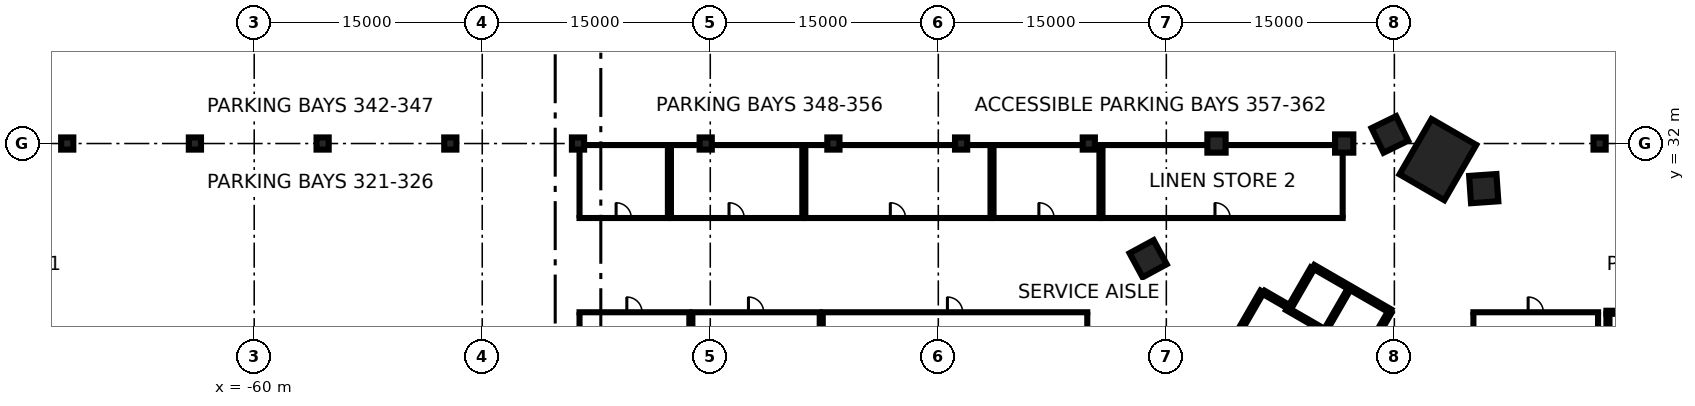
"""IFC4 building model, lengths in metres.
Left out: names, types, materials, properties, quantities, classifications, styles, units other than length and angle.
Written with IfcOpenShell. Run it as: python <this file> out.ifc"""

import sys

from ifc_helpers import new_model, si_unit, direction, frame, frame_2d, origin, origin_2d, place, context, subcontext, project, spatial, rectangle, extrude, element, fill, save


model = new_model("IFC4")
c1 = context("Model", 3, precision=1e-05, world=origin(), true_north=direction((0.0, 1.0)))
c2 = subcontext(c1, "Body", "Model", "MODEL_VIEW")
j1 = project(units=[si_unit("LENGTHUNIT", "METRE"), si_unit("PLANEANGLEUNIT", "RADIAN")], contexts=[c1])
p1 = place(None, origin())
s1 = spatial("IfcSite", under=j1, at=p1, CompositionType="ELEMENT")
p2 = place(p1, origin())
s2 = spatial("IfcBuilding", under=s1, at=p2, CompositionType="ELEMENT")
p3 = place(p2, frame((0.0, 0.0, -3.6)))
s3 = spatial("IfcBuildingStorey", under=s2, at=p3, CompositionType="ELEMENT", Elevation=-3.6)
p4 = place(p3, frame((17.865, 30.942, -0.4), z_axis=(0.0, 0.0, 1.0), x_axis=(0.5, 0.866025403784, 0.0)))
e1 = element("IfcColumn", 1, at=p4, inside=s3, PredefinedType="COLUMN", context=c2, shape_type="SweptSolid", body=[
    extrude(rectangle(XDim=4.2, YDim=3.4, at=origin_2d()), origin(), (0.0, 0.0, 1.0), 3.55),
])
for number, where, z_axis, x_axis in (
    (2, (20.879, 29.034, -0.4), (0.0, 0.0, 1.0), (0.998, 0.07, 0.0)),
    (3, (14.705, 32.599, -0.4), (0.0, 0.0, 1.0), (-0.438, 0.899, 0.0)),
    (4, (-1.197, 24.423, -0.4), (0.0, 0.0, 1.0), (-0.476, 0.879, 0.0)),
):
    element("IfcColumn", number, at=place(p3, frame(where, z_axis=z_axis, x_axis=x_axis)), inside=s3, PredefinedType="COLUMN", context=c2, shape_type="SweptSolid", body=[
        extrude(rectangle(XDim=1.8, YDim=1.8, at=origin_2d()), origin(), (0.0, 0.0, 1.0), 3.55),
    ])
for number, where, z_axis, x_axis in (
    (5, (-72.3, 32.0, -0.4), (0.0, 0.0, 1.0), (1.0, 0.0, 0.0)),
    (6, (-63.9, 32.0, -0.4), (0.0, 0.0, 1.0), (1.0, 0.0, 0.0)),
    (7, (-55.5, 32.0, -0.4), (0.0, 0.0, 1.0), (1.0, 0.0, 0.0)),
    (8, (-47.1, 32.0, -0.4), (0.0, 0.0, 1.0), (1.0, 0.0, 0.0)),
    (9, (-38.7, 32.0, -0.4), (0.0, 0.0, 1.0), (1.0, 0.0, 0.0)),
    (10, (-30.3, 32.0, -0.4), (0.0, 0.0, 1.0), (1.0, 0.0, 0.0)),
    (11, (-21.9, 32.0, -0.4), (0.0, 0.0, 1.0), (1.0, 0.0, 0.0)),
    (12, (-13.5, 32.0, -0.4), (0.0, 0.0, 1.0), (1.0, 0.0, 0.0)),
    (13, (-5.1, 32.0, -0.4), (0.0, 0.0, 1.0), (1.0, 0.0, 0.0)),
):
    element("IfcColumn", number, at=place(p3, frame(where, z_axis=z_axis, x_axis=x_axis)), inside=s3, PredefinedType="COLUMN", context=c2, shape_type="SweptSolid", body=[
        extrude(rectangle(XDim=0.8, YDim=0.8, at=origin_2d()), origin(), (0.0, 0.0, 1.0), 3.55),
    ])
for number, where, z_axis, x_axis in (
    (14, (3.3, 32.0, -0.4), (0.0, 0.0, 1.0), (1.0, 0.0, 0.0)),
    (15, (11.7, 32.0, -0.4), (0.0, 0.0, 1.0), (1.0, 0.0, 0.0)),
):
    element("IfcColumn", number, at=place(p3, frame(where, z_axis=z_axis, x_axis=x_axis)), inside=s3, PredefinedType="COLUMN", context=c2, shape_type="SweptSolid", body=[
        extrude(rectangle(XDim=1.2, YDim=1.2, at=origin_2d()), origin(), (0.0, 0.0, 1.0), 3.55),
    ])
p5 = place(p3, frame((28.5, 32.0, -0.4), z_axis=(0.0, 0.0, 1.0), x_axis=(1.0, 0.0, 0.0)))
e16 = element("IfcColumn", 16, at=p5, inside=s3, PredefinedType="COLUMN", context=c2, shape_type="SweptSolid", body=[
    extrude(rectangle(XDim=0.8, YDim=0.8, at=origin_2d()), origin(), (0.0, 0.0, 1.0), 3.55),
])
p6 = place(p3, frame((3.179, 16.856, 0.0), z_axis=(0.0, 0.0, 1.0), x_axis=(0.500004234368, 0.866022959057, 0.0)))
e17 = element("IfcWall", 17, at=p6, inside=s3, PredefinedType="SHEAR", context=c2, shape_type="SweptSolid", body=[
    extrude(rectangle(XDim=6.25, YDim=0.25, at=frame_2d((3.125, 0.0))), origin(), (0.0, 0.0, 1.0), 3.15),
])
p7 = place(p3, frame((9.673, 23.903, 0.0), z_axis=(0.0, 0.0, 1.0), x_axis=(0.86603616409, -0.499981362141, 0.0)))
e18 = element("IfcWall", 18, at=p7, inside=s3, PredefinedType="SHEAR", context=c2, shape_type="SweptSolid", body=[
    extrude(rectangle(XDim=5.85, YDim=0.25, at=frame_2d((2.925, 0.0))), origin(), (0.0, 0.0, 1.0), 3.15),
])
for number, where, z_axis, x_axis in (
    (19, (8.123, 21.219, 0.0), (0.0, 0.0, 1.0), (0.5, 0.866, 0.0)),
    (20, (14.676, 20.87, 0.0), (0.0, 0.0, 1.0), (-0.5, -0.866, 0.0)),
):
    element("IfcWall", number, at=place(p3, frame(where, z_axis=z_axis, x_axis=x_axis)), inside=s3, PredefinedType="SHEAR", context=c2, shape_type="SweptSolid", body=[
        extrude(rectangle(XDim=2.975, YDim=0.25, at=frame_2d((1.487, 0.0))), origin(), (0.0, 0.0, 1.0), 3.15),
    ])
p8 = place(p3, frame((6.413, 22.206, 0.0), z_axis=(0.0, 0.0, 1.0), x_axis=(0.866016279763, -0.500015802937, 0.0)))
e21 = element("IfcWall", 21, at=p8, inside=s3, PredefinedType="SHEAR", context=c2, shape_type="SweptSolid", body=[
    extrude(rectangle(XDim=1.849, YDim=0.25, at=frame_2d((0.925, 0.0))), origin(), (0.0, 0.0, 1.0), 3.15),
])
p9 = place(p3, frame((13.21, 18.08, 0.0), z_axis=(0.0, 0.0, 1.0), x_axis=(-0.866030299012, 0.499991521122, 0.0)))
e22 = element("IfcWall", 22, at=p9, inside=s3, PredefinedType="SHEAR", context=c2, shape_type="SweptSolid", body=[
    extrude(rectangle(XDim=6.1, YDim=0.2, at=frame_2d((3.05, 0.0))), origin(), (0.0, 0.0, 1.0), 3.15),
])
p10 = place(p3, frame((10.489, 19.767, 0.0), z_axis=(0.0, 0.0, 1.0), x_axis=(0.499946628782, 0.866056215479, 0.0)))
e23 = element("IfcWall", 23, at=p10, inside=s3, PredefinedType="SHEAR", context=c2, shape_type="SweptSolid", body=[
    extrude(rectangle(XDim=3.048, YDim=0.2, at=frame_2d((1.524, 0.0))), origin(), (0.0, 0.0, 1.0), 3.15),
])
p11 = place(p3, frame((-38.7, 20.9, 0.0), z_axis=(0.0, 0.0, 1.0), x_axis=(1.0, 0.0, 0.0)))
e24 = element("IfcWall", 24, at=p11, inside=s3, PredefinedType="PARTITIONING", context=c2, shape_type="SweptSolid", body=[
    extrude(rectangle(XDim=7.423, YDim=0.2, at=frame_2d((3.712, 0.0))), origin(), (0.0, 0.0, 1.0), 3.15),
])
p12 = place(p11, frame((3.212, 0.0, 0.0)))
e25 = element("IfcOpeningElement", 25, at=p12, cuts=e24, PredefinedType="OPENING", context=c2, shape_type="SweptSolid", body=[
    extrude(rectangle(XDim=1.0, YDim=2.1, at=frame_2d((0.5, 1.05))), frame((0.0, 0.11, 0.0), z_axis=(0.0, -1.0, 0.0), x_axis=(1.0, 0.0, 0.0)), (0.0, 0.0, 1.0), 0.22),
])
p13 = place(p3, frame((-38.6, 16.6, 0.0), z_axis=(0.0, 0.0, 1.0), x_axis=(0.0, 1.0, 0.0)))
e26 = element("IfcWall", 26, at=p13, inside=s3, PredefinedType="PARTITIONING", context=c2, shape_type="SweptSolid", body=[
    extrude(rectangle(XDim=4.2, YDim=0.2, at=frame_2d((2.1, 0.0))), origin(), (0.0, 0.0, 1.0), 3.15),
])
p14 = place(p3, frame((-31.377, 16.2, 0.0), z_axis=(0.0, 0.0, 1.0), x_axis=(0.0, 1.0, 0.0)))
e27 = element("IfcWall", 27, at=p14, inside=s3, PredefinedType="PARTITIONING", context=c2, shape_type="SweptSolid", body=[
    extrude(rectangle(XDim=4.6, YDim=0.2, at=frame_2d((2.3, 0.0))), origin(), (0.0, 0.0, 1.0), 3.15),
])
p15 = place(p3, frame((-31.277, 20.9, 0.0), z_axis=(0.0, 0.0, 1.0), x_axis=(1.0, 0.0, 0.0)))
e28 = element("IfcWall", 28, at=p15, inside=s3, PredefinedType="PARTITIONING", context=c2, shape_type="SweptSolid", body=[
    extrude(rectangle(XDim=8.577, YDim=0.2, at=frame_2d((4.288, 0.0))), origin(), (0.0, 0.0, 1.0), 3.15),
])
p16 = place(p15, frame((3.788, 0.0, 0.0)))
e29 = element("IfcOpeningElement", 29, at=p16, cuts=e28, PredefinedType="OPENING", context=c2, shape_type="SweptSolid", body=[
    extrude(rectangle(XDim=1.0, YDim=2.1, at=frame_2d((0.5, 1.05))), frame((0.0, 0.11, 0.0), z_axis=(0.0, -1.0, 0.0), x_axis=(1.0, 0.0, 0.0)), (0.0, 0.0, 1.0), 0.22),
])
for number, where, z_axis, x_axis in (
    (30, (-31.177, 16.2, 0.0), (0.0, 0.0, 1.0), (0.0, 1.0, 0.0)),
    (31, (-22.8, 16.2, 0.0), (0.0, 0.0, 1.0), (0.0, 1.0, 0.0)),
):
    element("IfcWall", number, at=place(p3, frame(where, z_axis=z_axis, x_axis=x_axis)), inside=s3, PredefinedType="PARTITIONING", context=c2, shape_type="SweptSolid", body=[
        extrude(rectangle(XDim=4.6, YDim=0.2, at=frame_2d((2.3, 0.0))), origin(), (0.0, 0.0, 1.0), 3.15),
    ])
p17 = place(p3, frame((-22.7, 20.9, 0.0), z_axis=(0.0, 0.0, 1.0), x_axis=(1.0, 0.0, 0.0)))
e32 = element("IfcWall", 32, at=p17, inside=s3, PredefinedType="PARTITIONING", context=c2, shape_type="SweptSolid", body=[
    extrude(rectangle(XDim=17.6, YDim=0.2, at=frame_2d((8.8, 0.0))), origin(), (0.0, 0.0, 1.0), 3.15),
])
p18 = place(p17, frame((8.3, 0.0, 0.0)))
e33 = element("IfcOpeningElement", 33, at=p18, cuts=e32, PredefinedType="OPENING", context=c2, shape_type="SweptSolid", body=[
    extrude(rectangle(XDim=1.0, YDim=2.1, at=frame_2d((0.5, 1.05))), frame((0.0, 0.11, 0.0), z_axis=(0.0, -1.0, 0.0), x_axis=(1.0, 0.0, 0.0)), (0.0, 0.0, 1.0), 0.22),
])
p19 = place(p3, frame((-22.6, 16.2, 0.0), z_axis=(0.0, 0.0, 1.0), x_axis=(0.0, 1.0, 0.0)))
e34 = element("IfcWall", 34, at=p19, inside=s3, PredefinedType="PARTITIONING", context=c2, shape_type="SweptSolid", body=[
    extrude(rectangle(XDim=4.6, YDim=0.2, at=frame_2d((2.3, 0.0))), origin(), (0.0, 0.0, 1.0), 3.15),
])
p20 = place(p3, frame((-5.2, 16.6, 0.0), z_axis=(0.0, 0.0, 1.0), x_axis=(0.0, 1.0, 0.0)))
e35 = element("IfcWall", 35, at=p20, inside=s3, PredefinedType="PARTITIONING", context=c2, shape_type="SweptSolid", body=[
    extrude(rectangle(XDim=4.2, YDim=0.2, at=frame_2d((2.1, 0.0))), origin(), (0.0, 0.0, 1.0), 3.15),
])
p21 = place(p3, frame((20.1, 20.9, 0.0), z_axis=(0.0, 0.0, 1.0), x_axis=(1.0, 0.0, 0.0)))
e36 = element("IfcWall", 36, at=p21, inside=s3, PredefinedType="PARTITIONING", context=c2, shape_type="SweptSolid", body=[
    extrude(rectangle(XDim=8.4, YDim=0.2, at=frame_2d((4.2, 0.0))), origin(), (0.0, 0.0, 1.0), 3.15),
])
p22 = place(p21, frame((3.7, 0.0, 0.0)))
e37 = element("IfcOpeningElement", 37, at=p22, cuts=e36, PredefinedType="OPENING", context=c2, shape_type="SweptSolid", body=[
    extrude(rectangle(XDim=1.0, YDim=2.1, at=frame_2d((0.5, 1.05))), frame((0.0, 0.11, 0.0), z_axis=(0.0, -1.0, 0.0), x_axis=(1.0, 0.0, 0.0)), (0.0, 0.0, 1.0), 0.22),
])
p23 = place(p3, frame((20.2, 16.6, 0.0), z_axis=(0.0, 0.0, 1.0), x_axis=(0.0, 1.0, 0.0)))
e38 = element("IfcWall", 38, at=p23, inside=s3, PredefinedType="PARTITIONING", context=c2, shape_type="SweptSolid", body=[
    extrude(rectangle(XDim=4.2, YDim=0.2, at=frame_2d((2.1, 0.0))), origin(), (0.0, 0.0, 1.0), 3.15),
])
p24 = place(p3, frame((28.4, 16.4, 0.0), z_axis=(0.0, 0.0, 1.0), x_axis=(0.0, 1.0, 0.0)))
e39 = element("IfcWall", 39, at=p24, inside=s3, PredefinedType="PARTITIONING", context=c2, shape_type="SweptSolid", body=[
    extrude(rectangle(XDim=4.4, YDim=0.2, at=frame_2d((2.2, 0.0))), origin(), (0.0, 0.0, 1.0), 3.15),
])
p25 = place(p3, frame((-38.7, 27.1, 0.0), z_axis=(0.0, 0.0, 1.0), x_axis=(1.0, 0.0, 0.0)))
e40 = element("IfcWall", 40, at=p25, inside=s3, PredefinedType="PARTITIONING", context=c2, shape_type="SweptSolid", body=[
    extrude(rectangle(XDim=6.012, YDim=0.2, at=frame_2d((3.006, 0.0))), origin(), (0.0, 0.0, 1.0), 3.15),
])
p26 = place(p25, frame((2.506, 0.0, 0.0)))
e41 = element("IfcOpeningElement", 41, at=p26, cuts=e40, PredefinedType="OPENING", context=c2, shape_type="SweptSolid", body=[
    extrude(rectangle(XDim=1.0, YDim=2.1, at=frame_2d((0.5, 1.05))), frame((0.0, 0.11, 0.0), z_axis=(0.0, -1.0, 0.0), x_axis=(1.0, 0.0, 0.0)), (0.0, 0.0, 1.0), 0.22),
])
p27 = place(p3, frame((-38.7, 31.9, 0.0), z_axis=(0.0, 0.0, 1.0), x_axis=(1.0, 0.0, 0.0)))
e42 = element("IfcWall", 42, at=p27, inside=s3, PredefinedType="PARTITIONING", context=c2, shape_type="SweptSolid", body=[
    extrude(rectangle(XDim=6.012, YDim=0.2, at=frame_2d((3.006, 0.0))), origin(), (0.0, 0.0, 1.0), 3.15),
])
p28 = place(p3, frame((-38.6, 27.2, 0.0), z_axis=(0.0, 0.0, 1.0), x_axis=(0.0, 1.0, 0.0)))
e43 = element("IfcWall", 43, at=p28, inside=s3, PredefinedType="PARTITIONING", context=c2, shape_type="SweptSolid", body=[
    extrude(rectangle(XDim=4.4, YDim=0.2, at=frame_2d((2.2, 0.0))), origin(), (0.0, 0.0, 1.0), 3.15),
])
p29 = place(p3, frame((-32.787, 27.2, 0.0), z_axis=(0.0, 0.0, 1.0), x_axis=(0.0, 1.0, 0.0)))
e44 = element("IfcWall", 44, at=p29, inside=s3, PredefinedType="PARTITIONING", context=c2, shape_type="SweptSolid", body=[
    extrude(rectangle(XDim=4.6, YDim=0.2, at=frame_2d((2.3, 0.0))), origin(), (0.0, 0.0, 1.0), 3.15),
])
p30 = place(p3, frame((-32.688, 27.1, 0.0), z_axis=(0.0, 0.0, 1.0), x_axis=(1.0, 0.0, 0.0)))
e45 = element("IfcWall", 45, at=p30, inside=s3, PredefinedType="PARTITIONING", context=c2, shape_type="SweptSolid", body=[
    extrude(rectangle(XDim=8.842, YDim=0.2, at=frame_2d((4.421, 0.0))), origin(), (0.0, 0.0, 1.0), 3.15),
])
p31 = place(p30, frame((3.921, 0.0, 0.0)))
e46 = element("IfcOpeningElement", 46, at=p31, cuts=e45, PredefinedType="OPENING", context=c2, shape_type="SweptSolid", body=[
    extrude(rectangle(XDim=1.0, YDim=2.1, at=frame_2d((0.5, 1.05))), frame((0.0, 0.11, 0.0), z_axis=(0.0, -1.0, 0.0), x_axis=(1.0, 0.0, 0.0)), (0.0, 0.0, 1.0), 0.22),
])
p32 = place(p3, frame((-32.688, 31.9, 0.0), z_axis=(0.0, 0.0, 1.0), x_axis=(1.0, 0.0, 0.0)))
e47 = element("IfcWall", 47, at=p32, inside=s3, PredefinedType="PARTITIONING", context=c2, shape_type="SweptSolid", body=[
    extrude(rectangle(XDim=8.842, YDim=0.2, at=frame_2d((4.421, 0.0))), origin(), (0.0, 0.0, 1.0), 3.15),
])
for number, where, z_axis, x_axis in (
    (48, (-32.587, 27.2, 0.0), (0.0, 0.0, 1.0), (0.0, 1.0, 0.0)),
    (49, (-23.945, 27.2, 0.0), (0.0, 0.0, 1.0), (0.0, 1.0, 0.0)),
):
    element("IfcWall", number, at=place(p3, frame(where, z_axis=z_axis, x_axis=x_axis)), inside=s3, PredefinedType="PARTITIONING", context=c2, shape_type="SweptSolid", body=[
        extrude(rectangle(XDim=4.6, YDim=0.2, at=frame_2d((2.3, 0.0))), origin(), (0.0, 0.0, 1.0), 3.15),
    ])
p33 = place(p3, frame((-23.845, 27.1, 0.0), z_axis=(0.0, 0.0, 1.0), x_axis=(1.0, 0.0, 0.0)))
e50 = element("IfcWall", 50, at=p33, inside=s3, PredefinedType="PARTITIONING", context=c2, shape_type="SweptSolid", body=[
    extrude(rectangle(XDim=12.379, YDim=0.2, at=frame_2d((6.189, 0.0))), origin(), (0.0, 0.0, 1.0), 3.15),
])
p34 = place(p33, frame((5.689, 0.0, 0.0)))
e51 = element("IfcOpeningElement", 51, at=p34, cuts=e50, PredefinedType="OPENING", context=c2, shape_type="SweptSolid", body=[
    extrude(rectangle(XDim=1.0, YDim=2.1, at=frame_2d((0.5, 1.05))), frame((0.0, 0.11, 0.0), z_axis=(0.0, -1.0, 0.0), x_axis=(1.0, 0.0, 0.0)), (0.0, 0.0, 1.0), 0.22),
])
p35 = place(p3, frame((-23.845, 31.9, 0.0), z_axis=(0.0, 0.0, 1.0), x_axis=(1.0, 0.0, 0.0)))
e52 = element("IfcWall", 52, at=p35, inside=s3, PredefinedType="PARTITIONING", context=c2, shape_type="SweptSolid", body=[
    extrude(rectangle(XDim=12.379, YDim=0.2, at=frame_2d((6.189, 0.0))), origin(), (0.0, 0.0, 1.0), 3.15),
])
for number, where, z_axis, x_axis in (
    (53, (-23.745, 27.2, 0.0), (0.0, 0.0, 1.0), (0.0, 1.0, 0.0)),
    (54, (-11.566, 27.2, 0.0), (0.0, 0.0, 1.0), (0.0, 1.0, 0.0)),
):
    element("IfcWall", number, at=place(p3, frame(where, z_axis=z_axis, x_axis=x_axis)), inside=s3, PredefinedType="PARTITIONING", context=c2, shape_type="SweptSolid", body=[
        extrude(rectangle(XDim=4.6, YDim=0.2, at=frame_2d((2.3, 0.0))), origin(), (0.0, 0.0, 1.0), 3.15),
    ])
p36 = place(p3, frame((-11.466, 27.1, 0.0), z_axis=(0.0, 0.0, 1.0), x_axis=(1.0, 0.0, 0.0)))
e55 = element("IfcWall", 55, at=p36, inside=s3, PredefinedType="PARTITIONING", context=c2, shape_type="SweptSolid", body=[
    extrude(rectangle(XDim=7.166, YDim=0.2, at=frame_2d((3.583, 0.0))), origin(), (0.0, 0.0, 1.0), 3.15),
])
p37 = place(p36, frame((3.083, 0.0, 0.0)))
e56 = element("IfcOpeningElement", 56, at=p37, cuts=e55, PredefinedType="OPENING", context=c2, shape_type="SweptSolid", body=[
    extrude(rectangle(XDim=1.0, YDim=2.1, at=frame_2d((0.5, 1.05))), frame((0.0, 0.11, 0.0), z_axis=(0.0, -1.0, 0.0), x_axis=(1.0, 0.0, 0.0)), (0.0, 0.0, 1.0), 0.22),
])
p38 = place(p3, frame((-11.466, 31.9, 0.0), z_axis=(0.0, 0.0, 1.0), x_axis=(1.0, 0.0, 0.0)))
e57 = element("IfcWall", 57, at=p38, inside=s3, PredefinedType="PARTITIONING", context=c2, shape_type="SweptSolid", body=[
    extrude(rectangle(XDim=7.166, YDim=0.2, at=frame_2d((3.583, 0.0))), origin(), (0.0, 0.0, 1.0), 3.15),
])
for number, where, z_axis, x_axis in (
    (58, (-11.366, 27.2, 0.0), (0.0, 0.0, 1.0), (0.0, 1.0, 0.0)),
    (59, (-4.4, 27.2, 0.0), (0.0, 0.0, 1.0), (0.0, 1.0, 0.0)),
):
    element("IfcWall", number, at=place(p3, frame(where, z_axis=z_axis, x_axis=x_axis)), inside=s3, PredefinedType="PARTITIONING", context=c2, shape_type="SweptSolid", body=[
        extrude(rectangle(XDim=4.6, YDim=0.2, at=frame_2d((2.3, 0.0))), origin(), (0.0, 0.0, 1.0), 3.15),
    ])
p39 = place(p3, frame((-4.3, 27.1, 0.0), z_axis=(0.0, 0.0, 1.0), x_axis=(1.0, 0.0, 0.0)))
e60 = element("IfcWall", 60, at=p39, inside=s3, PredefinedType="PARTITIONING", context=c2, shape_type="SweptSolid", body=[
    extrude(rectangle(XDim=16.0, YDim=0.2, at=frame_2d((8.0, 0.0))), origin(), (0.0, 0.0, 1.0), 3.15),
])
p40 = place(p39, frame((7.5, 0.0, 0.0)))
e61 = element("IfcOpeningElement", 61, at=p40, cuts=e60, PredefinedType="OPENING", context=c2, shape_type="SweptSolid", body=[
    extrude(rectangle(XDim=1.0, YDim=2.1, at=frame_2d((0.5, 1.05))), frame((0.0, 0.11, 0.0), z_axis=(0.0, -1.0, 0.0), x_axis=(1.0, 0.0, 0.0)), (0.0, 0.0, 1.0), 0.22),
])
p41 = place(p3, frame((-4.3, 31.9, 0.0), z_axis=(0.0, 0.0, 1.0), x_axis=(1.0, 0.0, 0.0)))
e62 = element("IfcWall", 62, at=p41, inside=s3, PredefinedType="PARTITIONING", context=c2, shape_type="SweptSolid", body=[
    extrude(rectangle(XDim=16.0, YDim=0.2, at=frame_2d((8.0, 0.0))), origin(), (0.0, 0.0, 1.0), 3.15),
])
p42 = place(p3, frame((-4.2, 27.2, 0.0), z_axis=(0.0, 0.0, 1.0), x_axis=(0.0, 1.0, 0.0)))
e63 = element("IfcWall", 63, at=p42, inside=s3, PredefinedType="PARTITIONING", context=c2, shape_type="SweptSolid", body=[
    extrude(rectangle(XDim=4.6, YDim=0.2, at=frame_2d((2.3, 0.0))), origin(), (0.0, 0.0, 1.0), 3.15),
])
p43 = place(p3, frame((11.6, 27.2, 0.0), z_axis=(0.0, 0.0, 1.0), x_axis=(0.0, 1.0, 0.0)))
e64 = element("IfcWall", 64, at=p43, inside=s3, PredefinedType="PARTITIONING", context=c2, shape_type="SweptSolid", body=[
    extrude(rectangle(XDim=4.2, YDim=0.2, at=frame_2d((2.1, 0.0))), origin(), (0.0, 0.0, 1.0), 3.15),
])
p44 = place(p3, frame((29.05, 11.2, 0.0), z_axis=(0.0, 0.0, 1.0), x_axis=(0.0, 1.0, 0.0)))
e65 = element("IfcWall", 65, at=p44, inside=s3, PredefinedType="SOLIDWALL", context=c2, shape_type="SweptSolid", body=[
    extrude(rectangle(XDim=9.6, YDim=0.2, at=frame_2d((4.8, 0.0))), origin(), (0.0, 0.0, 1.0), 3.15),
])
p45 = place(p3, frame((28.95, 20.9, 0.0), z_axis=(0.0, 0.0, 1.0), x_axis=(1.0, 0.0, 0.0)))
e66 = element("IfcWall", 66, at=p45, inside=s3, PredefinedType="SOLIDWALL", context=c2, shape_type="SweptSolid", body=[
    extrude(rectangle(XDim=4.55, YDim=0.2, at=frame_2d((2.275, 0.0))), origin(), (0.0, 0.0, 1.0), 3.15),
])
p46 = place(p12, origin())
e67 = element("IfcDoor", 67, at=p46, inside=s3, OperationType="SINGLE_SWING_LEFT", PredefinedType="DOOR", context=c2, shape_type="SweptSolid", body=[
    extrude(rectangle(XDim=1.0, YDim=2.1, at=frame_2d((0.5, 1.05))), frame((0.0, 0.025, 0.0), z_axis=(0.0, -1.0, 0.0), x_axis=(1.0, 0.0, 0.0)), (0.0, 0.0, 1.0), 0.05),
])
fill(e25, e67)
p47 = place(p16, origin())
e68 = element("IfcDoor", 68, at=p47, inside=s3, OperationType="SINGLE_SWING_LEFT", PredefinedType="DOOR", context=c2, shape_type="SweptSolid", body=[
    extrude(rectangle(XDim=1.0, YDim=2.1, at=frame_2d((0.5, 1.05))), frame((0.0, 0.025, 0.0), z_axis=(0.0, -1.0, 0.0), x_axis=(1.0, 0.0, 0.0)), (0.0, 0.0, 1.0), 0.05),
])
fill(e29, e68)
p48 = place(p18, origin())
e69 = element("IfcDoor", 69, at=p48, inside=s3, OperationType="SINGLE_SWING_LEFT", PredefinedType="DOOR", context=c2, shape_type="SweptSolid", body=[
    extrude(rectangle(XDim=1.0, YDim=2.1, at=frame_2d((0.5, 1.05))), frame((0.0, 0.025, 0.0), z_axis=(0.0, -1.0, 0.0), x_axis=(1.0, 0.0, 0.0)), (0.0, 0.0, 1.0), 0.05),
])
fill(e33, e69)
p49 = place(p22, origin())
e70 = element("IfcDoor", 70, at=p49, inside=s3, OperationType="SINGLE_SWING_LEFT", PredefinedType="DOOR", context=c2, shape_type="SweptSolid", body=[
    extrude(rectangle(XDim=1.0, YDim=2.1, at=frame_2d((0.5, 1.05))), frame((0.0, 0.025, 0.0), z_axis=(0.0, -1.0, 0.0), x_axis=(1.0, 0.0, 0.0)), (0.0, 0.0, 1.0), 0.05),
])
fill(e37, e70)
p50 = place(p26, origin())
e71 = element("IfcDoor", 71, at=p50, inside=s3, OperationType="SINGLE_SWING_LEFT", PredefinedType="DOOR", context=c2, shape_type="SweptSolid", body=[
    extrude(rectangle(XDim=1.0, YDim=2.1, at=frame_2d((0.5, 1.05))), frame((0.0, 0.025, 0.0), z_axis=(0.0, -1.0, 0.0), x_axis=(1.0, 0.0, 0.0)), (0.0, 0.0, 1.0), 0.05),
])
fill(e41, e71)
p51 = place(p31, origin())
e72 = element("IfcDoor", 72, at=p51, inside=s3, OperationType="SINGLE_SWING_LEFT", PredefinedType="DOOR", context=c2, shape_type="SweptSolid", body=[
    extrude(rectangle(XDim=1.0, YDim=2.1, at=frame_2d((0.5, 1.05))), frame((0.0, 0.025, 0.0), z_axis=(0.0, -1.0, 0.0), x_axis=(1.0, 0.0, 0.0)), (0.0, 0.0, 1.0), 0.05),
])
fill(e46, e72)
p52 = place(p34, origin())
e73 = element("IfcDoor", 73, at=p52, inside=s3, OperationType="SINGLE_SWING_LEFT", PredefinedType="DOOR", context=c2, shape_type="SweptSolid", body=[
    extrude(rectangle(XDim=1.0, YDim=2.1, at=frame_2d((0.5, 1.05))), frame((0.0, 0.025, 0.0), z_axis=(0.0, -1.0, 0.0), x_axis=(1.0, 0.0, 0.0)), (0.0, 0.0, 1.0), 0.05),
])
fill(e51, e73)
p53 = place(p37, origin())
e74 = element("IfcDoor", 74, at=p53, inside=s3, OperationType="SINGLE_SWING_LEFT", PredefinedType="DOOR", context=c2, shape_type="SweptSolid", body=[
    extrude(rectangle(XDim=1.0, YDim=2.1, at=frame_2d((0.5, 1.05))), frame((0.0, 0.025, 0.0), z_axis=(0.0, -1.0, 0.0), x_axis=(1.0, 0.0, 0.0)), (0.0, 0.0, 1.0), 0.05),
])
fill(e56, e74)
p54 = place(p40, origin())
e75 = element("IfcDoor", 75, at=p54, inside=s3, OperationType="SINGLE_SWING_LEFT", PredefinedType="DOOR", context=c2, shape_type="SweptSolid", body=[
    extrude(rectangle(XDim=1.0, YDim=2.1, at=frame_2d((0.5, 1.05))), frame((0.0, 0.025, 0.0), z_axis=(0.0, -1.0, 0.0), x_axis=(1.0, 0.0, 0.0)), (0.0, 0.0, 1.0), 0.05),
])
fill(e61, e75)
save(model, sys.argv[1])
